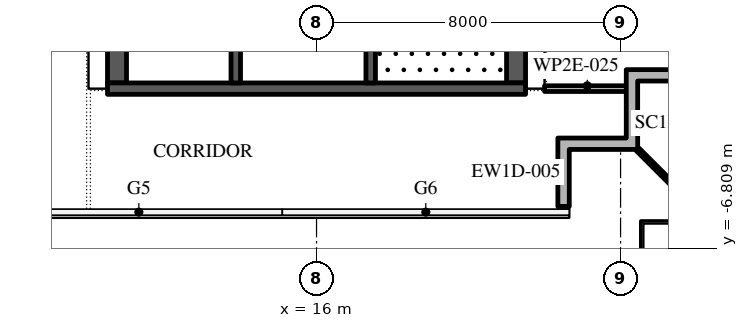
"""IFC4 building model, lengths in metres.
Left out: names, types, materials, properties, quantities, classifications, styles, units other than length and angle.
Written with IfcOpenShell. Run it as: python <this file> out.ifc"""

import sys

from ifc_helpers import new_model, si_unit, direction, frame, frame_2d, origin, place, context, subcontext, project, spatial, polyline, rectangle, outline, extrude, element, save


model = new_model("IFC4")
c1 = context("Model", 3, precision=1e-05, world=origin(), true_north=direction((0.0, 1.0)))
c2 = subcontext(c1, "Body", "Model", "MODEL_VIEW")
j1 = project(units=[si_unit("LENGTHUNIT", "METRE"), si_unit("PLANEANGLEUNIT", "RADIAN")], contexts=[c1])
p1 = place(None, origin())
s1 = spatial("IfcSite", under=j1, at=p1, CompositionType="ELEMENT")
p2 = place(p1, origin())
s2 = spatial("IfcBuilding", under=s1, at=p2, CompositionType="ELEMENT")
p3 = place(p2, frame((0.0, 0.0, 359.4)))
s3 = spatial("IfcBuildingStorey", under=s2, at=p3, CompositionType="ELEMENT", Elevation=359.4)
p4 = place(p3, origin())
e1 = element("IfcWall", 1, at=p4, inside=s3, PredefinedType="STANDARD", context=c2, shape_type="SweptSolid", body=[
    extrude(outline(polyline([(24.15, -3.9), (24.15, -2.1), (26.25, -2.1), (26.25, -2.4), (24.45, -2.4), (24.45, -4.2), (22.65, -4.2), (22.65, -5.7), (22.35, -5.7), (22.35, -3.9), (24.15, -3.9)])), origin(), (0.0, 0.0, 1.0), 3.9),
])
p5 = place(p3, frame((24.45, -4.2, -0.05), z_axis=(0.0, 0.0, 1.0), x_axis=(0.707106781187, -0.707106781187, 0.0)))
e2 = element("IfcWall", 2, at=p5, inside=s3, PredefinedType="STANDARD", context=c2, shape_type="SweptSolid", body=[
    extrude(rectangle(XDim=2.667, YDim=0.1, at=frame_2d((1.333, 0.0))), origin(), (0.0, 0.0, 1.0), 3.95),
])
p6 = place(p3, frame((21.25, -2.45, 0.0), z_axis=(0.0, 0.0, 1.0), x_axis=(0.0, 1.0, 0.0)))
e3 = element("IfcWall", 3, at=p6, inside=s3, PredefinedType="SHEAR", context=c2, shape_type="SweptSolid", body=[
    extrude(rectangle(XDim=27.9, YDim=0.5, at=frame_2d((13.95, 0.0))), origin(), (0.0, 0.0, 1.0), 3.9),
])
p7 = place(p6, frame((5.05, 0.0, 0.0)))
e4 = element("IfcOpeningElement", 4, at=p7, cuts=e3, PredefinedType="OPENING", context=c2, shape_type="SweptSolid", body=[
    extrude(rectangle(XDim=1.2, YDim=2.1, at=frame_2d((0.6, 1.05))), frame((0.0, 0.26, 0.0), z_axis=(0.0, -1.0, 0.0), x_axis=(1.0, 0.0, 0.0)), (0.0, 0.0, 1.0), 0.52),
])
p8 = place(p6, frame((21.65, 0.0, 0.0)))
e5 = element("IfcOpeningElement", 5, at=p8, cuts=e3, PredefinedType="OPENING", context=c2, shape_type="SweptSolid", body=[
    extrude(rectangle(XDim=1.2, YDim=2.1, at=frame_2d((0.6, 1.05))), frame((0.0, 0.26, 0.0), z_axis=(0.0, -1.0, 0.0), x_axis=(1.0, 0.0, 0.0)), (0.0, 0.0, 1.0), 0.52),
])
p9 = place(p3, frame((10.75, -2.45, 0.0), z_axis=(0.0, 0.0, 1.0), x_axis=(0.0, 1.0, 0.0)))
e6 = element("IfcWall", 6, at=p9, inside=s3, PredefinedType="SHEAR", context=c2, shape_type="SweptSolid", body=[
    extrude(rectangle(XDim=27.9, YDim=0.5, at=frame_2d((13.95, 0.0))), origin(), (0.0, 0.0, 1.0), 3.9),
])
p10 = place(p9, frame((23.65, 0.0, 0.0)))
e7 = element("IfcOpeningElement", 7, at=p10, cuts=e6, PredefinedType="OPENING", context=c2, shape_type="SweptSolid", body=[
    extrude(rectangle(XDim=2.4, YDim=2.1, at=frame_2d((1.2, 1.05))), frame((0.0, 0.26, 0.0), z_axis=(0.0, -1.0, 0.0), x_axis=(1.0, 0.0, 0.0)), (0.0, 0.0, 1.0), 0.52),
])
p11 = place(p9, frame((1.387, 0.0, 0.0)))
e8 = element("IfcOpeningElement", 8, at=p11, cuts=e6, PredefinedType="OPENING", context=c2, shape_type="SweptSolid", body=[
    extrude(rectangle(XDim=0.9, YDim=2.1, at=frame_2d((0.45, 1.05))), frame((0.0, 0.26, 0.0), z_axis=(0.0, -1.0, 0.0), x_axis=(1.0, 0.0, 0.0)), (0.0, 0.0, 1.0), 0.52),
])
p12 = place(p9, frame((4.562, 0.0, 0.0)))
e9 = element("IfcOpeningElement", 9, at=p12, cuts=e6, PredefinedType="OPENING", context=c2, shape_type="SweptSolid", body=[
    extrude(rectangle(XDim=1.0, YDim=2.1, at=frame_2d((0.5, 1.05))), frame((0.0, 0.26, 0.0), z_axis=(0.0, -1.0, 0.0), x_axis=(1.0, 0.0, 0.0)), (0.0, 0.0, 1.0), 0.52),
])
p13 = place(p3, frame((10.5, -2.6, 0.0), z_axis=(0.0, 0.0, 1.0), x_axis=(1.0, 0.0, 0.0)))
e10 = element("IfcWall", 10, at=p13, inside=s3, PredefinedType="SHEAR", context=c2, shape_type="SweptSolid", body=[
    extrude(rectangle(XDim=11.0, YDim=0.3, at=frame_2d((5.5, 0.0))), origin(), (0.0, 0.0, 1.0), 3.9),
])
p14 = place(p3, frame((17.425, -2.45, 0.0), z_axis=(0.0, 0.0, 1.0), x_axis=(0.0, 1.0, 0.0)))
e11 = element("IfcWall", 11, at=p14, inside=s3, PredefinedType="SHEAR", context=c2, shape_type="SweptSolid", body=[
    extrude(rectangle(XDim=6.3, YDim=0.25, at=frame_2d((3.15, 0.0))), origin(), (0.0, 0.0, 1.0), 3.9),
])
p15 = place(p14, frame((5.05, 0.0, 0.0)))
e12 = element("IfcOpeningElement", 12, at=p15, cuts=e11, PredefinedType="OPENING", context=c2, shape_type="SweptSolid", body=[
    extrude(rectangle(XDim=1.2, YDim=2.1, at=frame_2d((0.6, 1.05))), frame((0.0, 0.135, 0.0), z_axis=(0.0, -1.0, 0.0), x_axis=(1.0, 0.0, 0.0)), (0.0, 0.0, 1.0), 0.27),
])
p16 = place(p3, frame((13.875, -2.45, 0.0), z_axis=(0.0, 0.0, 1.0), x_axis=(0.0, 1.0, 0.0)))
e13 = element("IfcWall", 13, at=p16, inside=s3, PredefinedType="SHEAR", context=c2, shape_type="SweptSolid", body=[
    extrude(rectangle(XDim=21.3, YDim=0.25, at=frame_2d((10.65, 0.0))), origin(), (0.0, 0.0, 1.0), 3.9),
])
p17 = place(p16, frame((9.846, 0.0, 0.0)))
e14 = element("IfcOpeningElement", 14, at=p17, cuts=e13, PredefinedType="OPENING", context=c2, shape_type="SweptSolid", body=[
    extrude(rectangle(XDim=0.9, YDim=2.1, at=frame_2d((0.45, 1.05))), frame((0.0, 0.135, 0.0), z_axis=(0.0, -1.0, 0.0), x_axis=(1.0, 0.0, 0.0)), (0.0, 0.0, 1.0), 0.27),
])
p18 = place(p16, frame((12.911, 0.0, 0.0)))
e15 = element("IfcOpeningElement", 15, at=p18, cuts=e13, PredefinedType="OPENING", context=c2, shape_type="SweptSolid", body=[
    extrude(rectangle(XDim=0.9, YDim=2.1, at=frame_2d((0.45, 1.05))), frame((0.0, 0.135, 0.0), z_axis=(0.0, -1.0, 0.0), x_axis=(1.0, 0.0, 0.0)), (0.0, 0.0, 1.0), 0.27),
])
p19 = place(p16, frame((6.971, 0.0, 0.0)))
e16 = element("IfcOpeningElement", 16, at=p19, cuts=e13, PredefinedType="OPENING", context=c2, shape_type="SweptSolid", body=[
    extrude(rectangle(XDim=1.1, YDim=2.1, at=frame_2d((0.55, 1.05))), frame((0.0, 0.135, 0.0), z_axis=(0.0, -1.0, 0.0), x_axis=(1.0, 0.0, 0.0)), (0.0, 0.0, 1.0), 0.27),
])
p20 = place(p16, frame((15.543, 0.0, 0.0)))
e17 = element("IfcOpeningElement", 17, at=p20, cuts=e13, PredefinedType="OPENING", context=c2, shape_type="SweptSolid", body=[
    extrude(rectangle(XDim=1.1, YDim=2.1, at=frame_2d((0.55, 1.05))), frame((0.0, 0.135, 0.0), z_axis=(0.0, -1.0, 0.0), x_axis=(1.0, 0.0, 0.0)), (0.0, 0.0, 1.0), 0.27),
])
p21 = place(p16, frame((17.686, 0.0, 0.0)))
e18 = element("IfcOpeningElement", 18, at=p21, cuts=e13, PredefinedType="OPENING", context=c2, shape_type="SweptSolid", body=[
    extrude(rectangle(XDim=1.1, YDim=2.1, at=frame_2d((0.55, 1.05))), frame((0.0, 0.135, 0.0), z_axis=(0.0, -1.0, 0.0), x_axis=(1.0, 0.0, 0.0)), (0.0, 0.0, 1.0), 0.27),
])
p22 = place(p16, frame((19.829, 0.0, 0.0)))
e19 = element("IfcOpeningElement", 19, at=p22, cuts=e13, PredefinedType="OPENING", context=c2, shape_type="SweptSolid", body=[
    extrude(rectangle(XDim=1.1, YDim=2.1, at=frame_2d((0.55, 1.05))), frame((0.0, 0.135, 0.0), z_axis=(0.0, -1.0, 0.0), x_axis=(1.0, 0.0, 0.0)), (0.0, 0.0, 1.0), 0.27),
])
p23 = place(p3, frame((22.0, -2.6, 0.0), z_axis=(0.0, 0.0, 1.0), x_axis=(1.0, 0.0, 0.0)))
e20 = element("IfcWall", 20, at=p23, inside=s3, PredefinedType="PARTITIONING", context=c2, shape_type="SweptSolid", body=[
    extrude(rectangle(XDim=2.25, YDim=0.15, at=frame_2d((1.125, 0.0))), origin(), (0.0, 0.0, 1.0), 3.9),
])
save(model, sys.argv[1])
